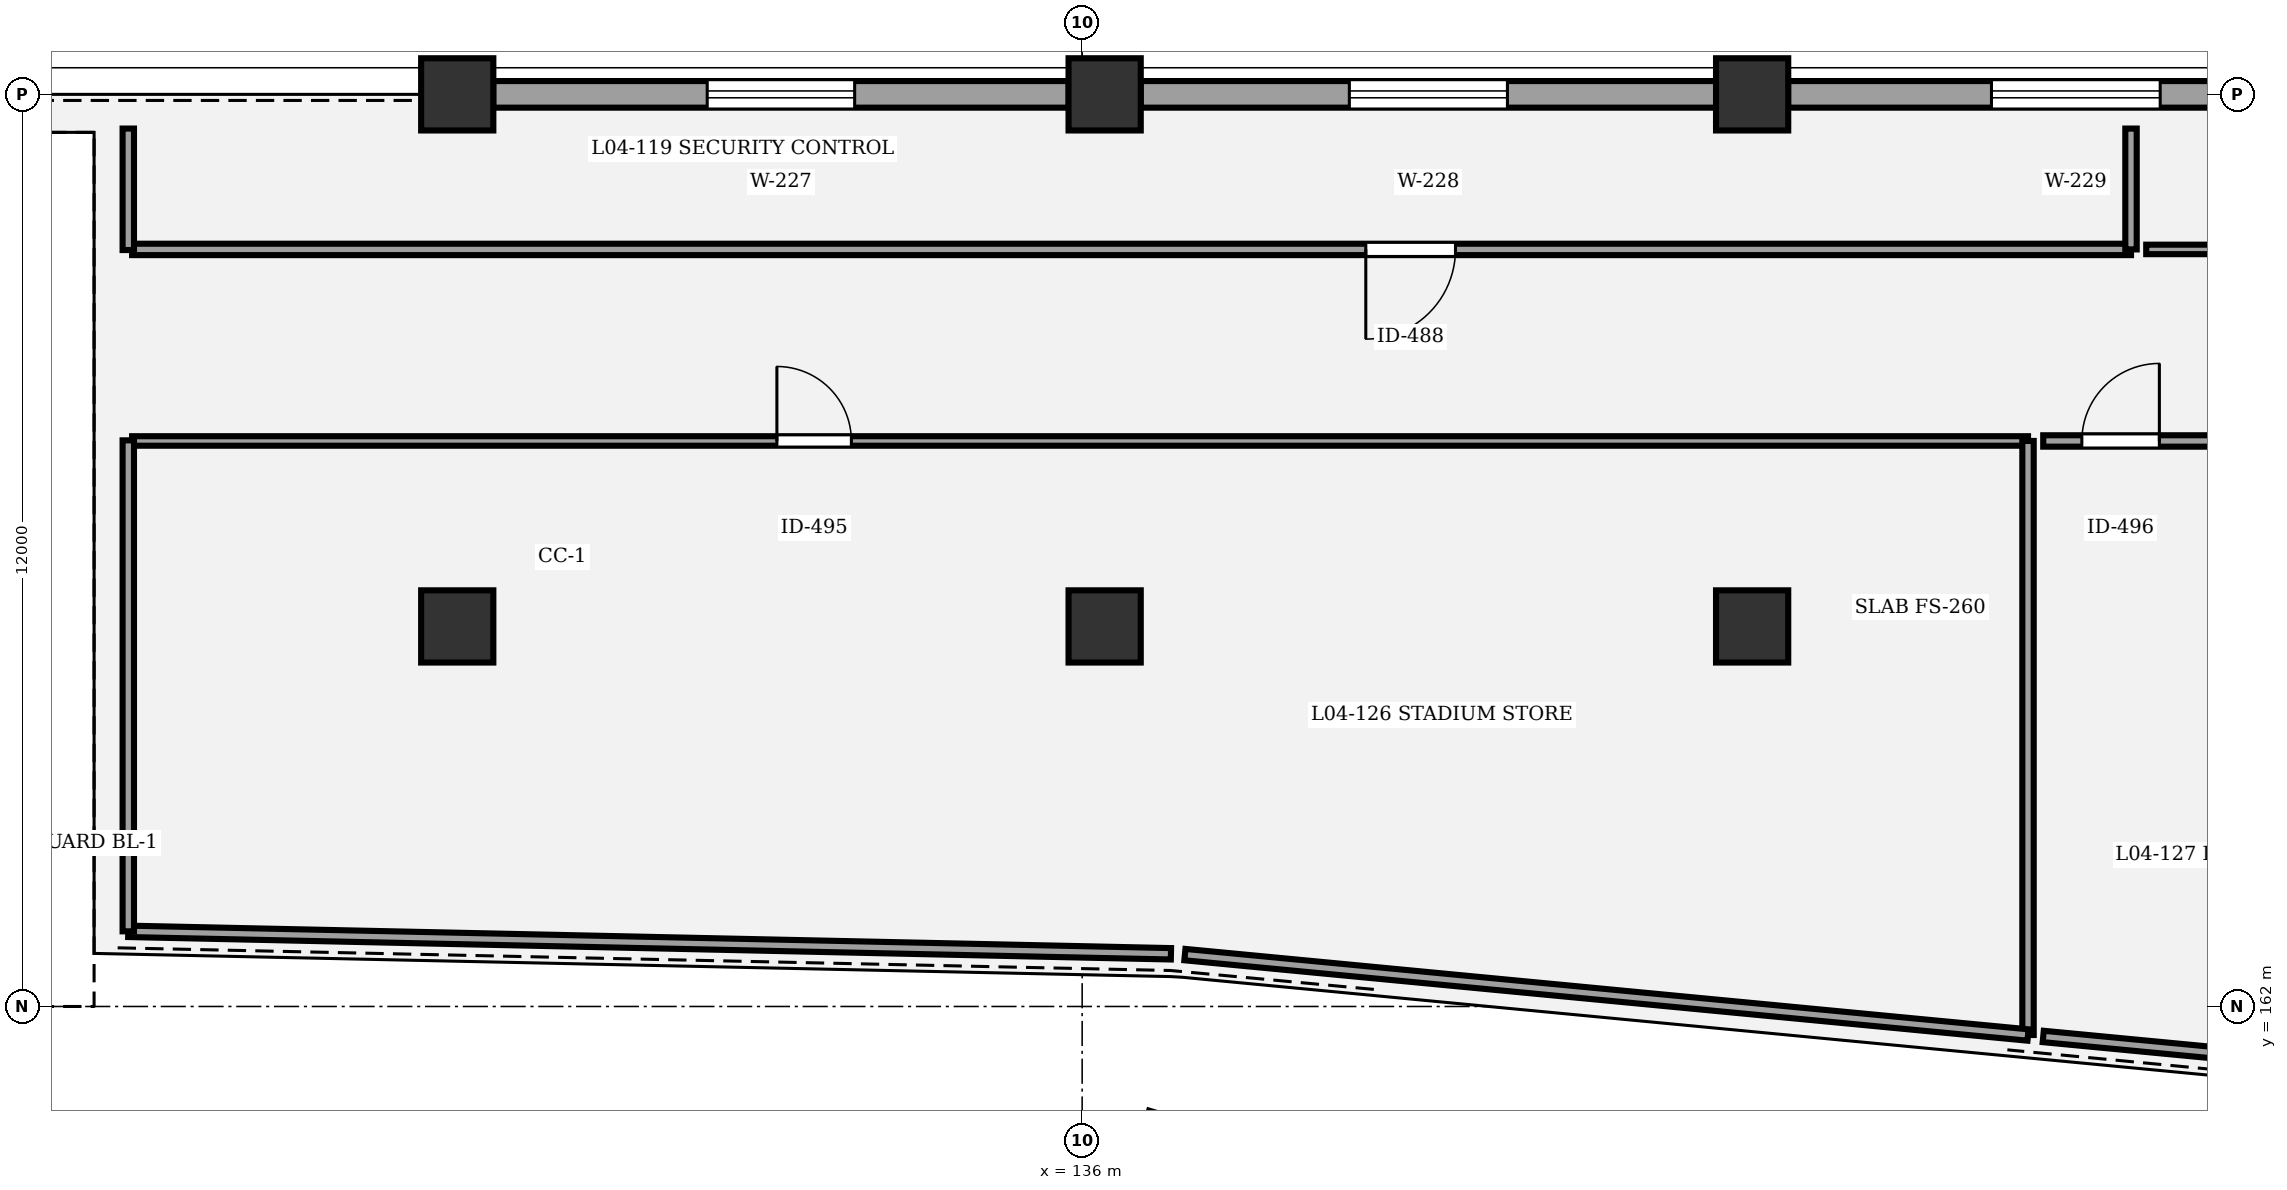
"""IFC4 building model, lengths in metres.
Left out: names, types, materials, properties, quantities, classifications, styles, units other than length and angle.
Written with IfcOpenShell. Run it as: python <this file> out.ifc"""

import sys

from ifc_helpers import new_model, si_unit, direction, frame, frame_2d, origin, origin_2d, place, context, subcontext, project, spatial, rectangle, circle, extrude, element, fill, save


model = new_model("IFC4")
c1 = context("Model", 3, precision=1e-05, world=origin(), true_north=direction((0.0, 1.0)))
c2 = subcontext(c1, "Body", "Model", "MODEL_VIEW")
j1 = project(units=[si_unit("LENGTHUNIT", "METRE"), si_unit("PLANEANGLEUNIT", "RADIAN")], contexts=[c1])
p1 = place(None, origin())
s1 = spatial("IfcSite", under=j1, at=p1, CompositionType="ELEMENT")
p2 = place(p1, origin())
s2 = spatial("IfcBuilding", under=s1, at=p2, CompositionType="ELEMENT")
p3 = place(p2, frame((0.0, 0.0, 19.2)))
s3 = spatial("IfcBuildingStorey", under=s2, at=p3, CompositionType="ELEMENT", Elevation=19.2)
p4 = place(p3, frame((137.115, 160.194, 0.0), z_axis=(0.0, 0.0, 1.0), x_axis=(0.289198876314, 0.957269037387, 0.0)))
e1 = element("IfcColumn", 1, at=p4, inside=s3, PredefinedType="COLUMN", context=c2, shape_type="SweptSolid", body=[
    extrude(rectangle(XDim=0.7, YDim=0.7, at=origin_2d()), origin(), (0.0, 0.0, 1.0), 4.8),
])
for number, where, z_axis, x_axis in (
    (2, (127.778, 167.0, 0.0), (0.0, 0.0, 1.0), (1.0, 0.0, 0.0)),
    (3, (127.778, 174.0, 0.0), (0.0, 0.0, 1.0), (1.0, 0.0, 0.0)),
    (4, (136.296, 167.0, 0.0), (0.0, 0.0, 1.0), (1.0, 0.0, 0.0)),
    (5, (136.296, 174.0, 0.0), (0.0, 0.0, 1.0), (1.0, 0.0, 0.0)),
    (6, (144.815, 167.0, 0.0), (0.0, 0.0, 1.0), (1.0, 0.0, 0.0)),
    (7, (144.815, 174.0, 0.0), (0.0, 0.0, 1.0), (1.0, 0.0, 0.0)),
):
    element("IfcColumn", number, at=place(p3, frame(where, z_axis=z_axis, x_axis=x_axis)), inside=s3, PredefinedType="COLUMN", context=c2, shape_type="SweptSolid", body=[
        extrude(circle(Radius=0.475, at=origin_2d()), origin(), (0.0, 0.0, 1.0), 4.8),
    ])
p5 = place(p3, frame((128.251, 174.0, 0.0), z_axis=(0.0, 0.0, 1.0), x_axis=(1.0, 0.0, 0.0)))
e8 = element("IfcWall", 8, at=p5, inside=s3, PredefinedType="STANDARD", context=c2, shape_type="SweptSolid", body=[
    extrude(rectangle(XDim=7.572, YDim=0.35, at=frame_2d((3.786, 0.0))), origin(), (0.0, 0.0, 1.0), 3.56),
])
p6 = place(p5, frame((2.816, 0.0, 0.9)))
e9 = element("IfcOpeningElement", 9, at=p6, cuts=e8, PredefinedType="OPENING", context=c2, shape_type="SweptSolid", body=[
    extrude(rectangle(XDim=1.94, YDim=1.55, at=frame_2d((0.97, 0.775))), frame((0.0, 0.185, 0.0), z_axis=(0.0, -1.0, 0.0), x_axis=(1.0, 0.0, 0.0)), (0.0, 0.0, 1.0), 0.37),
])
p7 = place(p3, frame((136.769, 174.0, 0.0), z_axis=(0.0, 0.0, 1.0), x_axis=(1.0, 0.0, 0.0)))
e10 = element("IfcWall", 10, at=p7, inside=s3, PredefinedType="STANDARD", context=c2, shape_type="SweptSolid", body=[
    extrude(rectangle(XDim=7.573, YDim=0.35, at=frame_2d((3.787, 0.0))), origin(), (0.0, 0.0, 1.0), 3.56),
])
p8 = place(p7, frame((2.747, 0.0, 0.9)))
e11 = element("IfcOpeningElement", 11, at=p8, cuts=e10, PredefinedType="OPENING", context=c2, shape_type="SweptSolid", body=[
    extrude(rectangle(XDim=2.08, YDim=1.55, at=frame_2d((1.04, 0.775))), frame((0.0, 0.185, 0.0), z_axis=(0.0, -1.0, 0.0), x_axis=(1.0, 0.0, 0.0)), (0.0, 0.0, 1.0), 0.37),
])
p9 = place(p3, frame((145.288, 174.0, 0.0), z_axis=(0.0, 0.0, 1.0), x_axis=(1.0, 0.0, 0.0)))
e12 = element("IfcWall", 12, at=p9, inside=s3, PredefinedType="STANDARD", context=c2, shape_type="SweptSolid", body=[
    extrude(rectangle(XDim=7.572, YDim=0.35, at=frame_2d((3.786, 0.0))), origin(), (0.0, 0.0, 1.0), 3.56),
])
p10 = place(p9, frame((2.676, 0.0, 0.9)))
e13 = element("IfcOpeningElement", 13, at=p10, cuts=e12, PredefinedType="OPENING", context=c2, shape_type="SweptSolid", body=[
    extrude(rectangle(XDim=2.22, YDim=1.55, at=frame_2d((1.11, 0.775))), frame((0.0, 0.185, 0.0), z_axis=(0.0, -1.0, 0.0), x_axis=(1.0, 0.0, 0.0)), (0.0, 0.0, 1.0), 0.37),
])
p11 = place(p3, frame((149.8, 171.96, 0.0), z_axis=(0.0, 0.0, 1.0), x_axis=(-1.0, 0.0, 0.0)))
e14 = element("IfcWall", 14, at=p11, inside=s3, PredefinedType="PARTITIONING", context=c2, shape_type="SweptSolid", body=[
    extrude(rectangle(XDim=26.3, YDim=0.15, at=frame_2d((13.15, 0.0))), origin(), (0.0, 0.0, 1.0), 3.55),
])
p12 = place(p11, frame((8.888, 0.0, 0.0)))
e15 = element("IfcOpeningElement", 15, at=p12, cuts=e14, PredefinedType="OPENING", context=c2, shape_type="SweptSolid", body=[
    extrude(rectangle(XDim=1.18, YDim=2.2, at=frame_2d((0.59, 1.1))), frame((0.0, 0.085, 0.0), z_axis=(0.0, -1.0, 0.0), x_axis=(1.0, 0.0, 0.0)), (0.0, 0.0, 1.0), 0.17),
])
p13 = place(p3, frame((176.1, 171.96, 0.0), z_axis=(0.0, 0.0, 1.0), x_axis=(-1.0, 0.0, 0.0)))
e16 = element("IfcWall", 16, at=p13, inside=s3, PredefinedType="PARTITIONING", context=c2, shape_type="SweptSolid", body=[
    extrude(rectangle(XDim=26.1, YDim=0.125, at=frame_2d((13.05, 0.0))), origin(), (0.0, 0.0, 1.0), 3.55),
])
p14 = place(p13, frame((8.804, 0.0, 0.0)))
e17 = element("IfcOpeningElement", 17, at=p14, cuts=e16, PredefinedType="OPENING", context=c2, shape_type="SweptSolid", body=[
    extrude(rectangle(XDim=1.22, YDim=2.2, at=frame_2d((0.61, 1.1))), frame((0.0, 0.073, 0.0), z_axis=(0.0, -1.0, 0.0), x_axis=(1.0, 0.0, 0.0)), (0.0, 0.0, 1.0), 0.145),
])
p15 = place(p3, frame((123.5, 169.44, 0.0), z_axis=(0.0, 0.0, 1.0), x_axis=(1.0, 0.0, 0.0)))
e18 = element("IfcWall", 18, at=p15, inside=s3, PredefinedType="PARTITIONING", context=c2, shape_type="SweptSolid", body=[
    extrude(rectangle(XDim=24.945, YDim=0.125, at=frame_2d((12.473, 0.0))), origin(), (0.0, 0.0, 1.0), 3.55),
])
p16 = place(p15, frame((8.484, 0.0, 0.0)))
e19 = element("IfcOpeningElement", 19, at=p16, cuts=e18, PredefinedType="OPENING", context=c2, shape_type="SweptSolid", body=[
    extrude(rectangle(XDim=0.98, YDim=2.3, at=frame_2d((0.49, 1.15))), frame((0.0, 0.073, 0.0), z_axis=(0.0, -1.0, 0.0), x_axis=(1.0, 0.0, 0.0)), (0.0, 0.0, 1.0), 0.145),
])
p17 = place(p3, frame((148.645, 169.44, 0.0), z_axis=(0.0, 0.0, 1.0), x_axis=(1.0, 0.0, 0.0)))
e20 = element("IfcWall", 20, at=p17, inside=s3, PredefinedType="PARTITIONING", context=c2, shape_type="SweptSolid", body=[
    extrude(rectangle(XDim=5.42, YDim=0.15, at=frame_2d((2.71, 0.0))), origin(), (0.0, 0.0, 1.0), 3.55),
])
p18 = place(p17, frame((0.508, 0.0, 0.0)))
e21 = element("IfcOpeningElement", 21, at=p18, cuts=e20, PredefinedType="OPENING", context=c2, shape_type="SweptSolid", body=[
    extrude(rectangle(XDim=1.02, YDim=2.3, at=frame_2d((0.51, 1.15))), frame((0.0, 0.085, 0.0), z_axis=(0.0, -1.0, 0.0), x_axis=(1.0, 0.0, 0.0)), (0.0, 0.0, 1.0), 0.17),
])
p19 = place(p3, frame((123.45, 171.952, 0.0), z_axis=(0.0, 0.0, 1.0), x_axis=(0.0, 1.0, 0.0)))
e22 = element("IfcWall", 22, at=p19, inside=s3, PredefinedType="PARTITIONING", context=c2, shape_type="SweptSolid", body=[
    extrude(rectangle(XDim=1.598, YDim=0.15, at=frame_2d((0.799, 0.0))), origin(), (0.0, 0.0, 1.0), 3.55),
])
p20 = place(p3, frame((149.8, 173.55, 0.0), z_axis=(0.0, 0.0, 1.0), x_axis=(0.0, -1.0, 0.0)))
e23 = element("IfcWall", 23, at=p20, inside=s3, PredefinedType="PARTITIONING", context=c2, shape_type="SweptSolid", body=[
    extrude(rectangle(XDim=1.59, YDim=0.15, at=frame_2d((0.795, 0.0))), origin(), (0.0, 0.0, 1.0), 3.55),
])
p21 = place(p3, frame((137.168, 162.693, 0.0), z_axis=(0.0, 0.0, 1.0), x_axis=(-0.999768230535, 0.021528706714, 0.0)))
e24 = element("IfcWall", 24, at=p21, inside=s3, PredefinedType="PARTITIONING", context=c2, shape_type="SweptSolid", body=[
    extrude(rectangle(XDim=13.722, YDim=0.15, at=frame_2d((6.861, 0.0))), origin(), (0.0, 0.0, 1.0), 3.55),
])
p22 = place(p3, frame((123.45, 162.989, 0.0), z_axis=(0.0, 0.0, 1.0), x_axis=(0.0, 1.0, 0.0)))
e25 = element("IfcWall", 25, at=p22, inside=s3, PredefinedType="PARTITIONING", context=c2, shape_type="SweptSolid", body=[
    extrude(rectangle(XDim=6.46, YDim=0.15, at=frame_2d((3.23, 0.0))), origin(), (0.0, 0.0, 1.0), 3.55),
])
p23 = place(p3, frame((148.445, 169.44, 0.0), z_axis=(0.0, 0.0, 1.0), x_axis=(0.0, -1.0, 0.0)))
e26 = element("IfcWall", 26, at=p23, inside=s3, PredefinedType="PARTITIONING", context=c2, shape_type="SweptSolid", body=[
    extrude(rectangle(XDim=7.815, YDim=0.15, at=frame_2d((3.908, 0.0))), origin(), (0.0, 0.0, 1.0), 3.55),
])
p24 = place(p3, frame((148.445, 161.625, 0.0), z_axis=(0.0, 0.0, 1.0), x_axis=(-0.995483944756, 0.094930057059, 0.0)))
e27 = element("IfcWall", 27, at=p24, inside=s3, PredefinedType="PARTITIONING", context=c2, shape_type="SweptSolid", body=[
    extrude(rectangle(XDim=11.144, YDim=0.15, at=frame_2d((5.572, 0.0))), origin(), (0.0, 0.0, 1.0), 3.55),
])
p25 = place(p3, frame((152.31, 161.256, 0.0), z_axis=(0.0, 0.0, 1.0), x_axis=(-0.995481155674, 0.094959300221, 0.0)))
e28 = element("IfcWall", 28, at=p25, inside=s3, PredefinedType="PARTITIONING", context=c2, shape_type="SweptSolid", body=[
    extrude(rectangle(XDim=3.682, YDim=0.15, at=frame_2d((1.841, 0.0))), origin(), (0.0, 0.0, 1.0), 3.55),
])
p26 = place(p6, origin())
e29 = element("IfcWindow", 29, at=p26, inside=s3, PartitioningType="SINGLE_PANEL", PredefinedType="WINDOW", context=c2, shape_type="SweptSolid", body=[
    extrude(rectangle(XDim=1.94, YDim=1.55, at=frame_2d((0.97, 0.775))), frame((0.0, 0.03, 0.0), z_axis=(0.0, -1.0, 0.0), x_axis=(1.0, 0.0, 0.0)), (0.0, 0.0, 1.0), 0.06),
])
fill(e9, e29)
p27 = place(p8, origin())
e30 = element("IfcWindow", 30, at=p27, inside=s3, PartitioningType="SINGLE_PANEL", PredefinedType="WINDOW", context=c2, shape_type="SweptSolid", body=[
    extrude(rectangle(XDim=2.08, YDim=1.55, at=frame_2d((1.04, 0.775))), frame((0.0, 0.03, 0.0), z_axis=(0.0, -1.0, 0.0), x_axis=(1.0, 0.0, 0.0)), (0.0, 0.0, 1.0), 0.06),
])
fill(e11, e30)
p28 = place(p10, origin())
e31 = element("IfcWindow", 31, at=p28, inside=s3, PartitioningType="SINGLE_PANEL", PredefinedType="WINDOW", context=c2, shape_type="SweptSolid", body=[
    extrude(rectangle(XDim=2.22, YDim=1.55, at=frame_2d((1.11, 0.775))), frame((0.0, 0.03, 0.0), z_axis=(0.0, -1.0, 0.0), x_axis=(1.0, 0.0, 0.0)), (0.0, 0.0, 1.0), 0.06),
])
fill(e13, e31)
p29 = place(p12, origin())
e32 = element("IfcDoor", 32, at=p29, inside=s3, OperationType="SINGLE_SWING_RIGHT", PredefinedType="DOOR", context=c2, shape_type="SweptSolid", body=[
    extrude(rectangle(XDim=1.18, YDim=2.2, at=frame_2d((0.59, 1.1))), frame((0.0, 0.025, 0.0), z_axis=(0.0, -1.0, 0.0), x_axis=(1.0, 0.0, 0.0)), (0.0, 0.0, 1.0), 0.05),
])
fill(e15, e32)
p30 = place(p16, origin())
e33 = element("IfcDoor", 33, at=p30, inside=s3, OperationType="SINGLE_SWING_LEFT", PredefinedType="DOOR", context=c2, shape_type="SweptSolid", body=[
    extrude(rectangle(XDim=0.98, YDim=2.3, at=frame_2d((0.49, 1.15))), frame((0.0, 0.025, 0.0), z_axis=(0.0, -1.0, 0.0), x_axis=(1.0, 0.0, 0.0)), (0.0, 0.0, 1.0), 0.05),
])
fill(e19, e33)
p31 = place(p18, origin())
e34 = element("IfcDoor", 34, at=p31, inside=s3, OperationType="SINGLE_SWING_RIGHT", PredefinedType="DOOR", context=c2, shape_type="SweptSolid", body=[
    extrude(rectangle(XDim=1.02, YDim=2.3, at=frame_2d((0.51, 1.15))), frame((0.0, 0.025, 0.0), z_axis=(0.0, -1.0, 0.0), x_axis=(1.0, 0.0, 0.0)), (0.0, 0.0, 1.0), 0.05),
])
fill(e21, e34)
save(model, sys.argv[1])
